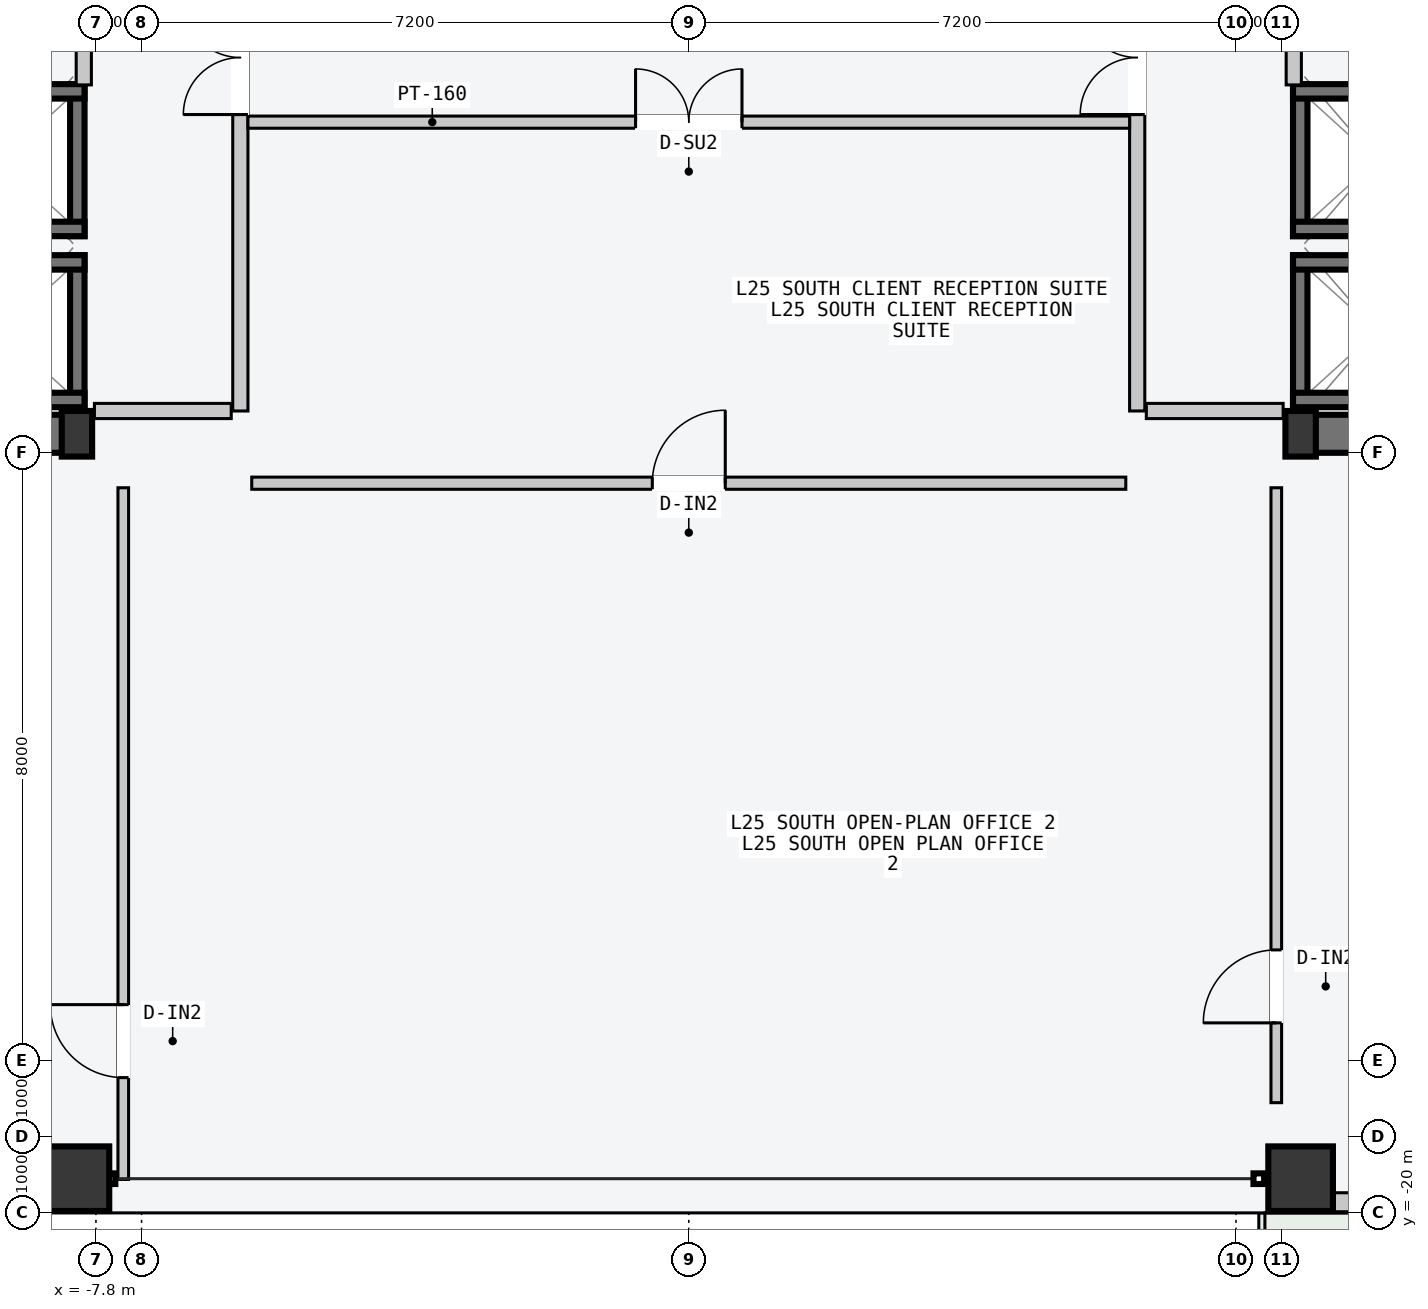
"""IFC4 building model, lengths in metres.
Left out: names, types, materials, properties, quantities, classifications, styles, units other than length and angle.
Written with IfcOpenShell. Run it as: python <this file> out.ifc"""

import sys

from ifc_helpers import new_model, si_unit, direction, frame, frame_2d, origin, origin_2d, place, context, subcontext, project, spatial, rectangle, hollow_rectangle, i_section, extrude, element, fill, save


model = new_model("IFC4")
c1 = context("Model", 3, precision=1e-05, world=origin(), true_north=direction((0.0, 1.0)))
c2 = subcontext(c1, "Body", "Model", "MODEL_VIEW")
j1 = project(units=[si_unit("LENGTHUNIT", "METRE"), si_unit("PLANEANGLEUNIT", "RADIAN")], contexts=[c1])
p1 = place(None, origin())
s1 = spatial("IfcSite", under=j1, at=p1, CompositionType="ELEMENT")
p2 = place(p1, origin())
s2 = spatial("IfcBuilding", under=s1, at=p2, CompositionType="ELEMENT")
p3 = place(p2, frame((0.0, 0.0, 99.0)))
s3 = spatial("IfcBuildingStorey", under=s2, at=p3, CompositionType="ELEMENT", Elevation=99.0)
for number, where, z_axis, x_axis in (
    (1, (-14.53, -9.75, -0.2), (0.0, 0.0, 1.0), (1.0, 0.0, 0.0)),
    (2, (8.07, -9.75, -0.2), (0.0, 0.0, 1.0), (1.0, 0.0, 0.0)),
):
    element("IfcWall", number, at=place(p3, frame(where, z_axis=z_axis, x_axis=x_axis)), inside=s3, PredefinedType="SHEAR", context=c2, shape_type="SweptSolid", body=[
        extrude(rectangle(XDim=6.46, YDim=0.5, at=frame_2d((3.23, 0.0))), origin(), (0.0, 0.0, 1.0), 3.6),
    ])
for number, where, z_axis, x_axis in (
    (3, (-8.05, -9.75, 0.0), (0.0, 0.0, 1.0), (1.0, 0.0, 0.0)),
    (4, (8.05, -9.75, 0.0), (0.0, 0.0, 1.0), (1.0, 0.0, 0.0)),
):
    element("IfcColumn", number, at=place(p3, frame(where, z_axis=z_axis, x_axis=x_axis)), inside=s3, PredefinedType="COLUMN", context=c2, shape_type="SweptSolid", body=[
        extrude(i_section(OverallWidth=0.4, OverallDepth=0.6, WebThickness=0.022, FlangeThickness=0.036, at=origin_2d()), origin(), (0.0, 0.0, 1.0), 3.6),
    ])
for number, where, z_axis, x_axis in (
    (5, (-8.05, -19.55, 0.0), (0.0, 0.0, 1.0), (1.0, 0.0, 0.0)),
    (6, (8.05, -19.55, 0.0), (0.0, 0.0, 1.0), (1.0, 0.0, 0.0)),
):
    element("IfcColumn", number, at=place(p3, frame(where, z_axis=z_axis, x_axis=x_axis)), inside=s3, PredefinedType="COLUMN", context=c2, shape_type="SweptSolid", body=[
        extrude(hollow_rectangle(XDim=0.85, YDim=0.85, WallThickness=0.04, at=origin_2d()), origin(), (0.0, 0.0, 1.0), 3.6),
    ])
p4 = place(p3, frame((8.495, -19.86, 0.0), z_axis=(0.0, 0.0, 1.0), x_axis=(1.0, 0.0, 0.0)))
e7 = element("IfcWall", 7, at=p4, inside=s3, PredefinedType="STANDARD", context=c2, shape_type="SweptSolid", body=[
    extrude(rectangle(XDim=5.61, YDim=0.25, at=frame_2d((2.805, 0.0))), origin(), (0.0, 0.0, 1.0), 3.4),
])
p5 = place(p4, frame((0.705, 0.0, 0.0)))
e8 = element("IfcOpeningElement", 8, at=p5, cuts=e7, PredefinedType="OPENING", context=c2, shape_type="SweptSolid", body=[
    extrude(rectangle(XDim=1.6, YDim=2.2, at=frame_2d((0.8, 1.1))), frame((0.0, 0.135, 0.0), z_axis=(0.0, -1.0, 0.0), x_axis=(1.0, 0.0, 0.0)), (0.0, 0.0, 1.0), 0.27),
])
p6 = place(p4, frame((3.105, 0.0, 0.85)))
e9 = element("IfcOpeningElement", 9, at=p6, cuts=e7, PredefinedType="OPENING", context=c2, shape_type="SweptSolid", body=[
    extrude(rectangle(XDim=2.0, YDim=2.1, at=frame_2d((1.0, 1.05))), frame((0.0, 0.135, 0.0), z_axis=(0.0, -1.0, 0.0), x_axis=(1.0, 0.0, 0.0)), (0.0, 0.0, 1.0), 0.27),
])
p7 = place(p3, frame((-8.045, -9.52, -0.2), z_axis=(0.0, 0.0, 1.0), x_axis=(0.0, 1.0, 0.0)))
e10 = element("IfcWall", 10, at=p7, inside=s3, PredefinedType="SOLIDWALL", context=c2, shape_type="SweptSolid", body=[
    extrude(rectangle(XDim=2.12, YDim=0.19, at=frame_2d((1.06, 0.0))), origin(), (0.0, 0.0, 1.0), 3.6),
])
for number, where, z_axis, x_axis in (
    (11, (-10.15, -7.495, -0.2), (0.0, 0.0, 1.0), (1.0, 0.0, 0.0)),
    (12, (-10.15, -9.305, -0.2), (0.0, 0.0, 1.0), (1.0, 0.0, 0.0)),
):
    element("IfcWall", number, at=place(p3, frame(where, z_axis=z_axis, x_axis=x_axis)), inside=s3, PredefinedType="SOLIDWALL", context=c2, shape_type="SweptSolid", body=[
        extrude(rectangle(XDim=2.2, YDim=0.19, at=frame_2d((1.1, 0.0))), origin(), (0.0, 0.0, 1.0), 3.6),
    ])
p8 = place(p3, frame((-8.045, -7.15, -0.2), z_axis=(0.0, 0.0, 1.0), x_axis=(0.0, 1.0, 0.0)))
e13 = element("IfcWall", 13, at=p8, inside=s3, PredefinedType="SOLIDWALL", context=c2, shape_type="SweptSolid", body=[
    extrude(rectangle(XDim=2.0, YDim=0.19, at=frame_2d((1.0, 0.0))), origin(), (0.0, 0.0, 1.0), 3.6),
])
for number, where, z_axis, x_axis in (
    (14, (-10.15, -5.245, -0.2), (0.0, 0.0, 1.0), (1.0, 0.0, 0.0)),
    (15, (-10.15, -7.055, -0.2), (0.0, 0.0, 1.0), (1.0, 0.0, 0.0)),
):
    element("IfcWall", number, at=place(p3, frame(where, z_axis=z_axis, x_axis=x_axis)), inside=s3, PredefinedType="SOLIDWALL", context=c2, shape_type="SweptSolid", body=[
        extrude(rectangle(XDim=2.2, YDim=0.19, at=frame_2d((1.1, 0.0))), origin(), (0.0, 0.0, 1.0), 3.6),
    ])
p9 = place(p3, frame((8.045, -9.52, -0.2), z_axis=(0.0, 0.0, 1.0), x_axis=(0.0, 1.0, 0.0)))
e16 = element("IfcWall", 16, at=p9, inside=s3, PredefinedType="SOLIDWALL", context=c2, shape_type="SweptSolid", body=[
    extrude(rectangle(XDim=2.12, YDim=0.19, at=frame_2d((1.06, 0.0))), origin(), (0.0, 0.0, 1.0), 3.6),
])
for number, where, z_axis, x_axis in (
    (17, (7.95, -7.495, -0.2), (0.0, 0.0, 1.0), (1.0, 0.0, 0.0)),
    (18, (7.95, -9.305, -0.2), (0.0, 0.0, 1.0), (1.0, 0.0, 0.0)),
):
    element("IfcWall", number, at=place(p3, frame(where, z_axis=z_axis, x_axis=x_axis)), inside=s3, PredefinedType="SOLIDWALL", context=c2, shape_type="SweptSolid", body=[
        extrude(rectangle(XDim=2.2, YDim=0.19, at=frame_2d((1.1, 0.0))), origin(), (0.0, 0.0, 1.0), 3.6),
    ])
p10 = place(p3, frame((8.045, -7.15, -0.2), z_axis=(0.0, 0.0, 1.0), x_axis=(0.0, 1.0, 0.0)))
e19 = element("IfcWall", 19, at=p10, inside=s3, PredefinedType="SOLIDWALL", context=c2, shape_type="SweptSolid", body=[
    extrude(rectangle(XDim=2.0, YDim=0.19, at=frame_2d((1.0, 0.0))), origin(), (0.0, 0.0, 1.0), 3.6),
])
for number, where, z_axis, x_axis in (
    (20, (7.95, -5.245, -0.2), (0.0, 0.0, 1.0), (1.0, 0.0, 0.0)),
    (21, (7.95, -7.055, -0.2), (0.0, 0.0, 1.0), (1.0, 0.0, 0.0)),
):
    element("IfcWall", number, at=place(p3, frame(where, z_axis=z_axis, x_axis=x_axis)), inside=s3, PredefinedType="SOLIDWALL", context=c2, shape_type="SweptSolid", body=[
        extrude(rectangle(XDim=2.2, YDim=0.19, at=frame_2d((1.1, 0.0))), origin(), (0.0, 0.0, 1.0), 3.6),
    ])
p11 = place(p3, frame((-5.9, -9.45, 0.0), z_axis=(0.0, 0.0, 1.0), x_axis=(0.0, 1.0, 0.0)))
e22 = element("IfcWall", 22, at=p11, inside=s3, PredefinedType="PARTITIONING", context=c2, shape_type="SweptSolid", body=[
    extrude(rectangle(XDim=10.5, YDim=0.2, at=frame_2d((5.25, 0.0))), origin(), (0.0, 0.0, 1.0), 3.4),
])
p12 = place(p11, frame((3.9, 0.0, 0.0)))
e23 = element("IfcOpeningElement", 23, at=p12, cuts=e22, PredefinedType="OPENING", context=c2, shape_type="SweptSolid", body=[
    extrude(rectangle(XDim=1.5, YDim=2.2, at=frame_2d((0.75, 1.1))), frame((0.0, 0.11, 0.0), z_axis=(0.0, -1.0, 0.0), x_axis=(1.0, 0.0, 0.0)), (0.0, 0.0, 1.0), 0.22),
])
p13 = place(p3, frame((-6.02, -9.45, 0.0), z_axis=(0.0, 0.0, 1.0), x_axis=(-1.0, 0.0, 0.0)))
e24 = element("IfcWall", 24, at=p13, inside=s3, PredefinedType="PARTITIONING", context=c2, shape_type="SweptSolid", body=[
    extrude(rectangle(XDim=1.8, YDim=0.2, at=frame_2d((0.9, 0.0))), origin(), (0.0, 0.0, 1.0), 3.4),
])
p14 = place(p3, frame((-7.96, -5.16, 0.0), z_axis=(0.0, 0.0, 1.0), x_axis=(0.0, 1.0, 0.0)))
e25 = element("IfcWall", 25, at=p14, inside=s3, PredefinedType="PARTITIONING", context=c2, shape_type="SweptSolid", body=[
    extrude(rectangle(XDim=2.44, YDim=0.2, at=frame_2d((1.22, 0.0))), origin(), (0.0, 0.0, 1.0), 3.4),
])
p15 = place(p3, frame((5.9, -9.45, 0.0), z_axis=(0.0, 0.0, 1.0), x_axis=(0.0, 1.0, 0.0)))
e26 = element("IfcWall", 26, at=p15, inside=s3, PredefinedType="PARTITIONING", context=c2, shape_type="SweptSolid", body=[
    extrude(rectangle(XDim=18.9, YDim=0.2, at=frame_2d((9.45, 0.0))), origin(), (0.0, 0.0, 1.0), 3.4),
])
p16 = place(p15, frame((3.9, 0.0, 0.0)))
e27 = element("IfcOpeningElement", 27, at=p16, cuts=e26, PredefinedType="OPENING", context=c2, shape_type="SweptSolid", body=[
    extrude(rectangle(XDim=1.5, YDim=2.2, at=frame_2d((0.75, 1.1))), frame((0.0, 0.11, 0.0), z_axis=(0.0, -1.0, 0.0), x_axis=(1.0, 0.0, 0.0)), (0.0, 0.0, 1.0), 0.22),
])
p17 = place(p3, frame((6.02, -9.45, 0.0), z_axis=(0.0, 0.0, 1.0), x_axis=(1.0, 0.0, 0.0)))
e28 = element("IfcWall", 28, at=p17, inside=s3, PredefinedType="PARTITIONING", context=c2, shape_type="SweptSolid", body=[
    extrude(rectangle(XDim=1.8, YDim=0.2, at=frame_2d((0.9, 0.0))), origin(), (0.0, 0.0, 1.0), 3.4),
])
p18 = place(p3, frame((7.96, -5.16, 0.0), z_axis=(0.0, 0.0, 1.0), x_axis=(0.0, 1.0, 0.0)))
e29 = element("IfcWall", 29, at=p18, inside=s3, PredefinedType="PARTITIONING", context=c2, shape_type="SweptSolid", body=[
    extrude(rectangle(XDim=2.44, YDim=0.2, at=frame_2d((1.22, 0.0))), origin(), (0.0, 0.0, 1.0), 3.4),
])
p19 = place(p3, frame((-5.8, -5.65, 0.0), z_axis=(0.0, 0.0, 1.0), x_axis=(1.0, 0.0, 0.0)))
e30 = element("IfcWall", 30, at=p19, inside=s3, PredefinedType="PARTITIONING", context=c2, shape_type="SweptSolid", body=[
    extrude(rectangle(XDim=11.6, YDim=0.16, at=frame_2d((5.8, 0.0))), origin(), (0.0, 0.0, 1.0), 3.4),
])
p20 = place(p19, frame((5.1, 0.0, 0.0)))
e31 = element("IfcOpeningElement", 31, at=p20, cuts=e30, PredefinedType="OPENING", context=c2, shape_type="SweptSolid", body=[
    extrude(rectangle(XDim=1.4, YDim=2.2, at=frame_2d((0.7, 1.1))), frame((0.0, 0.09, 0.0), z_axis=(0.0, -1.0, 0.0), x_axis=(1.0, 0.0, 0.0)), (0.0, 0.0, 1.0), 0.18),
])
p21 = place(p3, frame((-7.44, -19.56, 0.0), z_axis=(0.0, 0.0, 1.0), x_axis=(0.0, 1.0, 0.0)))
e32 = element("IfcWall", 32, at=p21, inside=s3, PredefinedType="PARTITIONING", context=c2, shape_type="SweptSolid", body=[
    extrude(rectangle(XDim=9.1, YDim=0.14, at=frame_2d((4.55, 0.0))), origin(), (0.0, 0.0, 1.0), 3.4),
])
p22 = place(p21, frame((1.34, 0.0, 0.0)))
e33 = element("IfcOpeningElement", 33, at=p22, cuts=e32, PredefinedType="OPENING", context=c2, shape_type="SweptSolid", body=[
    extrude(rectangle(XDim=0.96, YDim=2.18, at=frame_2d((0.48, 1.09))), frame((0.0, 0.08, 0.0), z_axis=(0.0, -1.0, 0.0), x_axis=(1.0, 0.0, 0.0)), (0.0, 0.0, 1.0), 0.16),
])
p23 = place(p3, frame((7.73, -18.55, 0.0), z_axis=(0.0, 0.0, 1.0), x_axis=(0.0, 1.0, 0.0)))
e34 = element("IfcWall", 34, at=p23, inside=s3, PredefinedType="PARTITIONING", context=c2, shape_type="SweptSolid", body=[
    extrude(rectangle(XDim=8.09, YDim=0.14, at=frame_2d((4.045, 0.0))), origin(), (0.0, 0.0, 1.0), 3.4),
])
p24 = place(p23, frame((1.05, 0.0, 0.0)))
e35 = element("IfcOpeningElement", 35, at=p24, cuts=e34, PredefinedType="OPENING", context=c2, shape_type="SweptSolid", body=[
    extrude(rectangle(XDim=0.96, YDim=2.18, at=frame_2d((0.48, 1.09))), frame((0.0, 0.08, 0.0), z_axis=(0.0, -1.0, 0.0), x_axis=(1.0, 0.0, 0.0)), (0.0, 0.0, 1.0), 0.16),
])
p25 = place(p3, frame((-5.75, -10.4, 0.0), z_axis=(0.0, 0.0, 1.0), x_axis=(1.0, 0.0, 0.0)))
e36 = element("IfcWall", 36, at=p25, inside=s3, PredefinedType="PARTITIONING", context=c2, shape_type="SweptSolid", body=[
    extrude(rectangle(XDim=11.5, YDim=0.16, at=frame_2d((5.75, 0.0))), origin(), (0.0, 0.0, 1.0), 3.4),
])
p26 = place(p25, frame((5.27, 0.0, 0.0)))
e37 = element("IfcOpeningElement", 37, at=p26, cuts=e36, PredefinedType="OPENING", context=c2, shape_type="SweptSolid", body=[
    extrude(rectangle(XDim=0.96, YDim=2.18, at=frame_2d((0.48, 1.09))), frame((0.0, 0.09, 0.0), z_axis=(0.0, -1.0, 0.0), x_axis=(1.0, 0.0, 0.0)), (0.0, 0.0, 1.0), 0.18),
])
p27 = place(p12, origin())
e38 = element("IfcDoor", 38, at=p27, inside=s3, OperationType="DOUBLE_DOOR_SINGLE_SWING", PredefinedType="DOOR", context=c2, shape_type="SweptSolid", body=[
    extrude(rectangle(XDim=1.5, YDim=2.2, at=frame_2d((0.75, 1.1))), frame((0.0, 0.025, 0.0), z_axis=(0.0, -1.0, 0.0), x_axis=(1.0, 0.0, 0.0)), (0.0, 0.0, 1.0), 0.05),
])
fill(e23, e38)
p28 = place(p16, origin())
e39 = element("IfcDoor", 39, at=p28, inside=s3, OperationType="DOUBLE_DOOR_SINGLE_SWING", PredefinedType="DOOR", context=c2, shape_type="SweptSolid", body=[
    extrude(rectangle(XDim=1.5, YDim=2.2, at=frame_2d((0.75, 1.1))), frame((0.0, 0.025, 0.0), z_axis=(0.0, -1.0, 0.0), x_axis=(1.0, 0.0, 0.0)), (0.0, 0.0, 1.0), 0.05),
])
fill(e27, e39)
p29 = place(p20, origin())
e40 = element("IfcDoor", 40, at=p29, inside=s3, OperationType="DOUBLE_DOOR_SINGLE_SWING", PredefinedType="DOOR", context=c2, shape_type="SweptSolid", body=[
    extrude(rectangle(XDim=1.4, YDim=2.2, at=frame_2d((0.7, 1.1))), frame((0.0, 0.025, 0.0), z_axis=(0.0, -1.0, 0.0), x_axis=(1.0, 0.0, 0.0)), (0.0, 0.0, 1.0), 0.05),
])
fill(e31, e40)
p30 = place(p22, origin())
e41 = element("IfcDoor", 41, at=p30, inside=s3, OperationType="SINGLE_SWING_RIGHT", PredefinedType="DOOR", context=c2, shape_type="SweptSolid", body=[
    extrude(rectangle(XDim=0.96, YDim=2.18, at=frame_2d((0.48, 1.09))), frame((0.0, 0.025, 0.0), z_axis=(0.0, -1.0, 0.0), x_axis=(1.0, 0.0, 0.0)), (0.0, 0.0, 1.0), 0.05),
])
fill(e33, e41)
p31 = place(p24, origin())
e42 = element("IfcDoor", 42, at=p31, inside=s3, OperationType="SINGLE_SWING_LEFT", PredefinedType="DOOR", context=c2, shape_type="SweptSolid", body=[
    extrude(rectangle(XDim=0.96, YDim=2.18, at=frame_2d((0.48, 1.09))), frame((0.0, 0.025, 0.0), z_axis=(0.0, -1.0, 0.0), x_axis=(1.0, 0.0, 0.0)), (0.0, 0.0, 1.0), 0.05),
])
fill(e35, e42)
p32 = place(p26, origin())
e43 = element("IfcDoor", 43, at=p32, inside=s3, OperationType="SINGLE_SWING_RIGHT", PredefinedType="DOOR", context=c2, shape_type="SweptSolid", body=[
    extrude(rectangle(XDim=0.96, YDim=2.18, at=frame_2d((0.48, 1.09))), frame((0.0, 0.025, 0.0), z_axis=(0.0, -1.0, 0.0), x_axis=(1.0, 0.0, 0.0)), (0.0, 0.0, 1.0), 0.05),
])
fill(e37, e43)
save(model, sys.argv[1])
